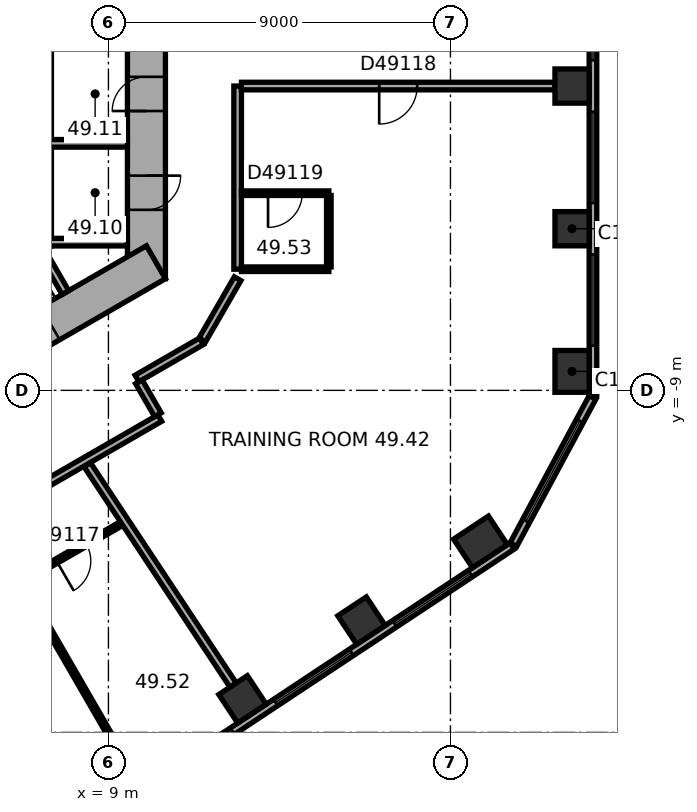
"""IFC4 building model, lengths in metres.
Left out: names, types, materials, properties, quantities, classifications, styles, units other than length and angle.
Written with IfcOpenShell. Run it as: python <this file> out.ifc"""

import sys

from ifc_helpers import new_model, si_unit, direction, frame, frame_2d, origin, origin_2d, place, context, subcontext, project, spatial, rectangle, extrude, element, fill, save


model = new_model("IFC4")
c1 = context("Model", 3, precision=1e-05, world=origin(), true_north=direction((0.0, 1.0)))
c2 = subcontext(c1, "Body", "Model", "MODEL_VIEW")
j1 = project(units=[si_unit("LENGTHUNIT", "METRE"), si_unit("PLANEANGLEUNIT", "RADIAN")], contexts=[c1])
p1 = place(None, origin())
s1 = spatial("IfcSite", under=j1, at=p1, CompositionType="ELEMENT")
p2 = place(p1, origin())
s2 = spatial("IfcBuilding", under=s1, at=p2, CompositionType="ELEMENT")
p3 = place(p2, frame((0.0, 0.0, 198.4)))
s3 = spatial("IfcBuildingStorey", under=s2, at=p3, CompositionType="ELEMENT", Elevation=198.4)
p4 = place(p3, frame((21.2, -8.501, 0.0), z_axis=(0.0, 0.0, 1.0), x_axis=(0.0, 1.0, 0.0)))
e1 = element("IfcColumn", 1, at=p4, inside=s3, PredefinedType="COLUMN", context=c2, shape_type="SweptSolid", body=[
    extrude(rectangle(XDim=1.1, YDim=0.9, at=origin_2d()), origin(), (0.0, 0.0, 1.0), 3.7),
])
for number, where, z_axis, x_axis in (
    (2, (21.2, -4.747, 0.0), (0.0, 0.0, 1.0), (0.0, 1.0, 0.0)),
    (3, (21.2, -0.993, 0.0), (0.0, 0.0, 1.0), (0.0, 1.0, 0.0)),
    (4, (12.529, -17.13, 0.0), (0.0, 0.0, 1.0), (0.834, 0.552, 0.0)),
    (5, (15.659, -15.058, 0.0), (0.0, 0.0, 1.0), (0.834, 0.552, 0.0)),
):
    element("IfcColumn", number, at=place(p3, frame(where, z_axis=z_axis, x_axis=x_axis)), inside=s3, PredefinedType="COLUMN", context=c2, shape_type="SweptSolid", body=[
        extrude(rectangle(XDim=0.9, YDim=0.9, at=origin_2d()), origin(), (0.0, 0.0, 1.0), 3.7),
    ])
p5 = place(p3, frame((18.79, -12.986, 0.0), z_axis=(0.0, 0.0, 1.0), x_axis=(0.833885822067, 0.551936985312, 0.0)))
e6 = element("IfcColumn", 6, at=p5, inside=s3, PredefinedType="COLUMN", context=c2, shape_type="SweptSolid", body=[
    extrude(rectangle(XDim=1.1, YDim=0.9, at=origin_2d()), origin(), (0.0, 0.0, 1.0), 3.7),
])
p6 = place(p3, frame((10.0, -6.062, 0.0), z_axis=(0.0, 0.0, 1.0), x_axis=(0.0, 1.0, 0.0)))
e7 = element("IfcWall", 7, at=p6, inside=s3, PredefinedType="SHEAR", context=c2, shape_type="SweptSolid", body=[
    extrude(rectangle(XDim=12.125, YDim=1.0, at=frame_2d((6.062, 0.0))), origin(), (0.0, 0.0, 1.0), 3.7),
])
p7 = place(p6, frame((6.262, 0.0, 0.0)))
e8 = element("IfcOpeningElement", 8, at=p7, cuts=e7, PredefinedType="OPENING", context=c2, shape_type="SweptSolid", body=[
    extrude(rectangle(XDim=1.5, YDim=2.1, at=frame_2d((0.75, 1.05))), frame((0.0, 0.51, 0.0), z_axis=(0.0, -1.0, 0.0), x_axis=(1.0, 0.0, 0.0)), (0.0, 0.0, 1.0), 1.02),
])
p8 = place(p6, frame((1.812, 0.0, 0.0)))
e9 = element("IfcOpeningElement", 9, at=p8, cuts=e7, PredefinedType="OPENING", context=c2, shape_type="SweptSolid", body=[
    extrude(rectangle(XDim=0.9, YDim=2.1, at=frame_2d((0.45, 1.05))), frame((0.0, 0.51, 0.0), z_axis=(0.0, -1.0, 0.0), x_axis=(1.0, 0.0, 0.0)), (0.0, 0.0, 1.0), 1.02),
])
p9 = place(p6, frame((4.412, 0.0, 0.0)))
e10 = element("IfcOpeningElement", 10, at=p9, cuts=e7, PredefinedType="OPENING", context=c2, shape_type="SweptSolid", body=[
    extrude(rectangle(XDim=0.9, YDim=2.1, at=frame_2d((0.45, 1.05))), frame((0.0, 0.51, 0.0), z_axis=(0.0, -1.0, 0.0), x_axis=(1.0, 0.0, 0.0)), (0.0, 0.0, 1.0), 1.02),
])
p10 = place(p3, frame((-0.25, -11.691, 0.0), z_axis=(0.0, 0.0, 1.0), x_axis=(0.866022616891, 0.50000482701, 0.0)))
e11 = element("IfcWall", 11, at=p10, inside=s3, PredefinedType="SHEAR", context=c2, shape_type="SweptSolid", body=[
    extrude(rectangle(XDim=12.125, YDim=1.0, at=frame_2d((6.062, 0.0))), origin(), (0.0, 0.0, 1.0), 3.7),
])
p11 = place(p10, frame((2.612, 0.0, 0.0)))
e12 = element("IfcOpeningElement", 12, at=p11, cuts=e11, PredefinedType="OPENING", context=c2, shape_type="SweptSolid", body=[
    extrude(rectangle(XDim=1.1, YDim=2.1, at=frame_2d((0.55, 1.05))), frame((0.0, 0.51, 0.0), z_axis=(0.0, -1.0, 0.0), x_axis=(1.0, 0.0, 0.0)), (0.0, 0.0, 1.0), 1.02),
])
p12 = place(p10, frame((5.212, 0.0, 0.0)))
e13 = element("IfcOpeningElement", 13, at=p12, cuts=e11, PredefinedType="OPENING", context=c2, shape_type="SweptSolid", body=[
    extrude(rectangle(XDim=1.1, YDim=2.1, at=frame_2d((0.55, 1.05))), frame((0.0, 0.51, 0.0), z_axis=(0.0, -1.0, 0.0), x_axis=(1.0, 0.0, 0.0)), (0.0, 0.0, 1.0), 1.02),
])
p13 = place(p10, frame((7.812, 0.0, 0.0)))
e14 = element("IfcOpeningElement", 14, at=p13, cuts=e11, PredefinedType="OPENING", context=c2, shape_type="SweptSolid", body=[
    extrude(rectangle(XDim=1.1, YDim=2.1, at=frame_2d((0.55, 1.05))), frame((0.0, 0.51, 0.0), z_axis=(0.0, -1.0, 0.0), x_axis=(1.0, 0.0, 0.0)), (0.0, 0.0, 1.0), 1.02),
])
p14 = place(p3, frame((21.75, -9.138, 0.0), z_axis=(0.0, 0.0, 1.0), x_axis=(0.0, 1.0, 0.0)))
e15 = element("IfcWall", 15, at=p14, inside=s3, PredefinedType="STANDARD", context=c2, shape_type="SweptSolid", body=[
    extrude(rectangle(XDim=20.044, YDim=0.2, at=frame_2d((10.022, 0.0))), origin(), (0.0, 0.0, 1.0), 3.7),
])
p15 = place(p14, frame((1.314, 0.0, 0.9)))
e16 = element("IfcOpeningElement", 16, at=p15, cuts=e15, PredefinedType="OPENING", context=c2, shape_type="SweptSolid", body=[
    extrude(rectangle(XDim=2.4, YDim=2.0, at=frame_2d((1.2, 1.0))), frame((0.0, 0.11, 0.0), z_axis=(0.0, -1.0, 0.0), x_axis=(1.0, 0.0, 0.0)), (0.0, 0.0, 1.0), 0.22),
])
p16 = place(p14, frame((5.069, 0.0, 0.9)))
e17 = element("IfcOpeningElement", 17, at=p16, cuts=e15, PredefinedType="OPENING", context=c2, shape_type="SweptSolid", body=[
    extrude(rectangle(XDim=2.4, YDim=2.0, at=frame_2d((1.2, 1.0))), frame((0.0, 0.11, 0.0), z_axis=(0.0, -1.0, 0.0), x_axis=(1.0, 0.0, 0.0)), (0.0, 0.0, 1.0), 0.22),
])
p17 = place(p14, frame((8.823, 0.0, 0.9)))
e18 = element("IfcOpeningElement", 18, at=p17, cuts=e15, PredefinedType="OPENING", context=c2, shape_type="SweptSolid", body=[
    extrude(rectangle(XDim=2.4, YDim=2.0, at=frame_2d((1.2, 1.0))), frame((0.0, 0.11, 0.0), z_axis=(0.0, -1.0, 0.0), x_axis=(1.0, 0.0, 0.0)), (0.0, 0.0, 1.0), 0.22),
])
p18 = place(p14, frame((12.577, 0.0, 0.9)))
e19 = element("IfcOpeningElement", 19, at=p18, cuts=e15, PredefinedType="OPENING", context=c2, shape_type="SweptSolid", body=[
    extrude(rectangle(XDim=2.4, YDim=2.0, at=frame_2d((1.2, 1.0))), frame((0.0, 0.11, 0.0), z_axis=(0.0, -1.0, 0.0), x_axis=(1.0, 0.0, 0.0)), (0.0, 0.0, 1.0), 0.22),
])
p19 = place(p14, frame((16.331, 0.0, 0.9)))
e20 = element("IfcOpeningElement", 20, at=p19, cuts=e15, PredefinedType="OPENING", context=c2, shape_type="SweptSolid", body=[
    extrude(rectangle(XDim=2.4, YDim=2.0, at=frame_2d((1.2, 1.0))), frame((0.0, 0.11, 0.0), z_axis=(0.0, -1.0, 0.0), x_axis=(1.0, 0.0, 0.0)), (0.0, 0.0, 1.0), 0.22),
])
p20 = place(p3, frame((2.911, -24.156, 0.0), z_axis=(0.0, 0.0, 1.0), x_axis=(0.833882163564, 0.551942512668, 0.0)))
e21 = element("IfcWall", 21, at=p20, inside=s3, PredefinedType="STANDARD", context=c2, shape_type="SweptSolid", body=[
    extrude(rectangle(XDim=20.044, YDim=0.2, at=frame_2d((10.022, 0.0))), origin(), (0.0, 0.0, 1.0), 3.7),
])
p21 = place(p20, frame((1.313, 0.0, 0.9)))
e22 = element("IfcOpeningElement", 22, at=p21, cuts=e21, PredefinedType="OPENING", context=c2, shape_type="SweptSolid", body=[
    extrude(rectangle(XDim=2.4, YDim=2.0, at=frame_2d((1.2, 1.0))), frame((0.0, 0.11, 0.0), z_axis=(0.0, -1.0, 0.0), x_axis=(1.0, 0.0, 0.0)), (0.0, 0.0, 1.0), 0.22),
])
p22 = place(p20, frame((5.067, 0.0, 0.9)))
e23 = element("IfcOpeningElement", 23, at=p22, cuts=e21, PredefinedType="OPENING", context=c2, shape_type="SweptSolid", body=[
    extrude(rectangle(XDim=2.4, YDim=2.0, at=frame_2d((1.2, 1.0))), frame((0.0, 0.11, 0.0), z_axis=(0.0, -1.0, 0.0), x_axis=(1.0, 0.0, 0.0)), (0.0, 0.0, 1.0), 0.22),
])
p23 = place(p20, frame((8.821, 0.0, 0.9)))
e24 = element("IfcOpeningElement", 24, at=p23, cuts=e21, PredefinedType="OPENING", context=c2, shape_type="SweptSolid", body=[
    extrude(rectangle(XDim=2.4, YDim=2.0, at=frame_2d((1.2, 1.0))), frame((0.0, 0.11, 0.0), z_axis=(0.0, -1.0, 0.0), x_axis=(1.0, 0.0, 0.0)), (0.0, 0.0, 1.0), 0.22),
])
p24 = place(p20, frame((12.575, 0.0, 0.9)))
e25 = element("IfcOpeningElement", 25, at=p24, cuts=e21, PredefinedType="OPENING", context=c2, shape_type="SweptSolid", body=[
    extrude(rectangle(XDim=2.4, YDim=2.0, at=frame_2d((1.2, 1.0))), frame((0.0, 0.11, 0.0), z_axis=(0.0, -1.0, 0.0), x_axis=(1.0, 0.0, 0.0)), (0.0, 0.0, 1.0), 0.22),
])
p25 = place(p20, frame((16.329, 0.0, 0.9)))
e26 = element("IfcOpeningElement", 26, at=p25, cuts=e21, PredefinedType="OPENING", context=c2, shape_type="SweptSolid", body=[
    extrude(rectangle(XDim=2.4, YDim=2.0, at=frame_2d((1.2, 1.0))), frame((0.0, 0.11, 0.0), z_axis=(0.0, -1.0, 0.0), x_axis=(1.0, 0.0, 0.0)), (0.0, 0.0, 1.0), 0.22),
])
p26 = place(p3, frame((19.658, -13.057, 0.0), z_axis=(0.0, 0.0, 1.0), x_axis=(0.473307879841, 0.880897071672, 0.0)))
e27 = element("IfcWall", 27, at=p26, inside=s3, PredefinedType="STANDARD", context=c2, shape_type="SweptSolid", body=[
    extrude(rectangle(XDim=4.395, YDim=0.2, at=frame_2d((2.197, 0.0))), origin(), (0.0, 0.0, 1.0), 3.7),
])
p27 = place(p26, frame((0.698, 0.0, 0.9)))
e28 = element("IfcOpeningElement", 28, at=p27, cuts=e27, PredefinedType="OPENING", context=c2, shape_type="SweptSolid", body=[
    extrude(rectangle(XDim=3.0, YDim=2.0, at=frame_2d((1.5, 1.0))), frame((0.0, 0.11, 0.0), z_axis=(0.0, -1.0, 0.0), x_axis=(1.0, 0.0, 0.0)), (0.0, 0.0, 1.0), 0.22),
])
for number, where, z_axis, x_axis in (
    (29, (7.3, -5.1, 0.0), (0.0, 0.0, 1.0), (1.0, 0.0, 0.0)),
    (30, (7.3, -2.5, 0.0), (0.0, 0.0, 1.0), (1.0, 0.0, 0.0)),
    (31, (6.768, -4.522, 0.0), (0.0, 0.0, 1.0), (0.5, -0.866, 0.0)),
):
    element("IfcWall", number, at=place(p3, frame(where, z_axis=z_axis, x_axis=x_axis)), inside=s3, PredefinedType="PARTITIONING", context=c2, shape_type="SweptSolid", body=[
        extrude(rectangle(XDim=2.2, YDim=0.2, at=frame_2d((1.1, 0.0))), origin(), (0.0, 0.0, 1.0), 3.42),
    ])
p28 = place(p3, frame((2.816, -14.079, 0.0), z_axis=(0.0, 0.0, 1.0), x_axis=(0.866021128829, 0.500007404367, 0.0)))
e32 = element("IfcWall", 32, at=p28, inside=s3, PredefinedType="PARTITIONING", context=c2, shape_type="SweptSolid", body=[
    extrude(rectangle(XDim=8.702, YDim=0.2, at=frame_2d((4.351, 0.0))), origin(), (0.0, 0.0, 1.0), 3.42),
])
p29 = place(p28, frame((2.714, 0.0, 0.0)))
e33 = element("IfcOpeningElement", 33, at=p29, cuts=e32, PredefinedType="OPENING", context=c2, shape_type="SweptSolid", body=[
    extrude(rectangle(XDim=1.0, YDim=2.1, at=frame_2d((0.5, 1.05))), frame((0.0, 0.11, 0.0), z_axis=(0.0, -1.0, 0.0), x_axis=(1.0, 0.0, 0.0)), (0.0, 0.0, 1.0), 0.22),
])
p30 = place(p3, frame((3.005, -16.164, 0.0), z_axis=(0.0, 0.0, 1.0), x_axis=(0.866018452427, 0.500012039911, 0.0)))
e34 = element("IfcWall", 34, at=p30, inside=s3, PredefinedType="PARTITIONING", context=c2, shape_type="SweptSolid", body=[
    extrude(rectangle(XDim=7.322, YDim=0.12, at=frame_2d((3.661, 0.0))), origin(), (0.0, 0.0, 1.0), 3.42),
])
p31 = place(p30, frame((0.55, 0.0, 0.0)))
e35 = element("IfcOpeningElement", 35, at=p31, cuts=e34, PredefinedType="OPENING", context=c2, shape_type="SweptSolid", body=[
    extrude(rectangle(XDim=1.0, YDim=2.1, at=frame_2d((0.5, 1.05))), frame((0.0, 0.07, 0.0), z_axis=(0.0, -1.0, 0.0), x_axis=(1.0, 0.0, 0.0)), (0.0, 0.0, 1.0), 0.14),
])
p32 = place(p30, frame((2.736, 0.0, 0.0)))
e36 = element("IfcOpeningElement", 36, at=p32, cuts=e34, PredefinedType="OPENING", context=c2, shape_type="SweptSolid", body=[
    extrude(rectangle(XDim=0.9, YDim=2.1, at=frame_2d((0.45, 1.05))), frame((0.0, 0.07, 0.0), z_axis=(0.0, -1.0, 0.0), x_axis=(1.0, 0.0, 0.0)), (0.0, 0.0, 1.0), 0.14),
])
p33 = place(p30, frame((5.347, 0.0, 0.0)))
e37 = element("IfcOpeningElement", 37, at=p33, cuts=e34, PredefinedType="OPENING", context=c2, shape_type="SweptSolid", body=[
    extrude(rectangle(XDim=0.9, YDim=2.1, at=frame_2d((0.45, 1.05))), frame((0.0, 0.07, 0.0), z_axis=(0.0, -1.0, 0.0), x_axis=(1.0, 0.0, 0.0)), (0.0, 0.0, 1.0), 0.14),
])
p34 = place(p3, frame((9.385, -18.672, 0.0), z_axis=(0.0, 0.0, 1.0), x_axis=(-0.500012117035, 0.866018407898, 0.0)))
e38 = element("IfcWall", 38, at=p34, inside=s3, PredefinedType="PARTITIONING", context=c2, shape_type="SweptSolid", body=[
    extrude(rectangle(XDim=5.302, YDim=0.12, at=frame_2d((2.651, 0.0))), origin(), (0.0, 0.0, 1.0), 2.87),
])
p35 = place(p3, frame((9.752, -8.688, 0.0), z_axis=(0.0, 0.0, 1.0), x_axis=(0.865974105138, 0.500088841337, 0.0)))
e39 = element("IfcWall", 39, at=p35, inside=s3, PredefinedType="PARTITIONING", context=c2, shape_type="SweptSolid", body=[
    extrude(rectangle(XDim=1.961, YDim=0.2, at=frame_2d((0.98, 0.0))), origin(), (0.0, 0.0, 1.0), 3.42),
])
p36 = place(p3, frame((10.302, -9.642, 0.0), z_axis=(0.0, 0.0, 1.0), x_axis=(-0.500074377092, 0.865982457891, 0.0)))
e40 = element("IfcWall", 40, at=p36, inside=s3, PredefinedType="PARTITIONING", context=c2, shape_type="SweptSolid", body=[
    extrude(rectangle(XDim=1.001, YDim=0.2, at=frame_2d((0.5, 0.0))), origin(), (0.0, 0.0, 1.0), 3.42),
])
p37 = place(p3, frame((11.47, -7.673, 0.0), z_axis=(0.0, 0.0, 1.0), x_axis=(0.499964847546, 0.866045698112, 0.0)))
e41 = element("IfcWall", 41, at=p37, inside=s3, PredefinedType="PARTITIONING", context=c2, shape_type="SweptSolid", body=[
    extrude(rectangle(XDim=1.86, YDim=0.2, at=frame_2d((0.93, 0.0))), origin(), (0.0, 0.0, 1.0), 3.42),
])
p38 = place(p3, frame((12.281, -16.755, 0.0), z_axis=(0.0, 0.0, 1.0), x_axis=(-0.551925794663, 0.833893228888, 0.0)))
e42 = element("IfcWall", 42, at=p38, inside=s3, PredefinedType="PARTITIONING", context=c2, shape_type="SweptSolid", body=[
    extrude(rectangle(XDim=6.953, YDim=0.2, at=frame_2d((3.476, 0.0))), origin(), (0.0, 0.0, 1.0), 3.42),
])
p39 = place(p3, frame((12.4, -5.812, 0.0), z_axis=(0.0, 0.0, 1.0), x_axis=(0.0, 1.0, 0.0)))
e43 = element("IfcWall", 43, at=p39, inside=s3, PredefinedType="PARTITIONING", context=c2, shape_type="SweptSolid", body=[
    extrude(rectangle(XDim=4.819, YDim=0.2, at=frame_2d((2.41, 0.0))), origin(), (0.0, 0.0, 1.0), 3.42),
])
p40 = place(p3, frame((12.5, -3.812, 0.0), z_axis=(0.0, 0.0, 1.0), x_axis=(1.0, 0.0, 0.0)))
e44 = element("IfcWall", 44, at=p40, inside=s3, PredefinedType="PARTITIONING", context=c2, shape_type="SweptSolid", body=[
    extrude(rectangle(XDim=2.3, YDim=0.12, at=frame_2d((1.15, 0.0))), origin(), (0.0, 0.0, 1.0), 3.42),
])
p41 = place(p40, frame((0.7, 0.0, 0.0)))
e45 = element("IfcOpeningElement", 45, at=p41, cuts=e44, PredefinedType="OPENING", context=c2, shape_type="SweptSolid", body=[
    extrude(rectangle(XDim=0.9, YDim=2.1, at=frame_2d((0.45, 1.05))), frame((0.0, 0.07, 0.0), z_axis=(0.0, -1.0, 0.0), x_axis=(1.0, 0.0, 0.0)), (0.0, 0.0, 1.0), 0.14),
])
p42 = place(p3, frame((12.5, -0.993, 0.0), z_axis=(0.0, 0.0, 1.0), x_axis=(1.0, 0.0, 0.0)))
e46 = element("IfcWall", 46, at=p42, inside=s3, PredefinedType="PARTITIONING", context=c2, shape_type="SweptSolid", body=[
    extrude(rectangle(XDim=8.25, YDim=0.2, at=frame_2d((4.125, 0.0))), origin(), (0.0, 0.0, 1.0), 2.87),
])
p43 = place(p42, frame((3.625, 0.0, 0.0)))
e47 = element("IfcOpeningElement", 47, at=p43, cuts=e46, PredefinedType="OPENING", context=c2, shape_type="SweptSolid", body=[
    extrude(rectangle(XDim=1.0, YDim=2.1, at=frame_2d((0.5, 1.05))), frame((0.0, 0.11, 0.0), z_axis=(0.0, -1.0, 0.0), x_axis=(1.0, 0.0, 0.0)), (0.0, 0.0, 1.0), 0.22),
])
p44 = place(p3, frame((14.8, -5.812, 0.0), z_axis=(0.0, 0.0, 1.0), x_axis=(-1.0, 0.0, 0.0)))
e48 = element("IfcWall", 48, at=p44, inside=s3, PredefinedType="PARTITIONING", context=c2, shape_type="SweptSolid", body=[
    extrude(rectangle(XDim=2.3, YDim=0.12, at=frame_2d((1.15, 0.0))), origin(), (0.0, 0.0, 1.0), 3.42),
])
p45 = place(p3, frame((14.8, -3.872, 0.0), z_axis=(0.0, 0.0, 1.0), x_axis=(0.0, -1.0, 0.0)))
e49 = element("IfcWall", 49, at=p45, inside=s3, PredefinedType="PARTITIONING", context=c2, shape_type="SweptSolid", body=[
    extrude(rectangle(XDim=1.88, YDim=0.12, at=frame_2d((0.94, 0.0))), origin(), (0.0, 0.0, 1.0), 3.42),
])
p46 = place(p15, origin())
e50 = element("IfcWindow", 50, at=p46, inside=s3, PartitioningType="SINGLE_PANEL", PredefinedType="WINDOW", context=c2, shape_type="SweptSolid", body=[
    extrude(rectangle(XDim=2.4, YDim=2.0, at=frame_2d((1.2, 1.0))), frame((0.0, 0.03, 0.0), z_axis=(0.0, -1.0, 0.0), x_axis=(1.0, 0.0, 0.0)), (0.0, 0.0, 1.0), 0.06),
])
fill(e16, e50)
p47 = place(p16, origin())
e51 = element("IfcWindow", 51, at=p47, inside=s3, PartitioningType="SINGLE_PANEL", PredefinedType="WINDOW", context=c2, shape_type="SweptSolid", body=[
    extrude(rectangle(XDim=2.4, YDim=2.0, at=frame_2d((1.2, 1.0))), frame((0.0, 0.03, 0.0), z_axis=(0.0, -1.0, 0.0), x_axis=(1.0, 0.0, 0.0)), (0.0, 0.0, 1.0), 0.06),
])
fill(e17, e51)
p48 = place(p17, origin())
e52 = element("IfcWindow", 52, at=p48, inside=s3, PartitioningType="SINGLE_PANEL", PredefinedType="WINDOW", context=c2, shape_type="SweptSolid", body=[
    extrude(rectangle(XDim=2.4, YDim=2.0, at=frame_2d((1.2, 1.0))), frame((0.0, 0.03, 0.0), z_axis=(0.0, -1.0, 0.0), x_axis=(1.0, 0.0, 0.0)), (0.0, 0.0, 1.0), 0.06),
])
fill(e18, e52)
p49 = place(p23, origin())
e53 = element("IfcWindow", 53, at=p49, inside=s3, PartitioningType="SINGLE_PANEL", PredefinedType="WINDOW", context=c2, shape_type="SweptSolid", body=[
    extrude(rectangle(XDim=2.4, YDim=2.0, at=frame_2d((1.2, 1.0))), frame((0.0, 0.03, 0.0), z_axis=(0.0, -1.0, 0.0), x_axis=(1.0, 0.0, 0.0)), (0.0, 0.0, 1.0), 0.06),
])
fill(e24, e53)
p50 = place(p24, origin())
e54 = element("IfcWindow", 54, at=p50, inside=s3, PartitioningType="SINGLE_PANEL", PredefinedType="WINDOW", context=c2, shape_type="SweptSolid", body=[
    extrude(rectangle(XDim=2.4, YDim=2.0, at=frame_2d((1.2, 1.0))), frame((0.0, 0.03, 0.0), z_axis=(0.0, -1.0, 0.0), x_axis=(1.0, 0.0, 0.0)), (0.0, 0.0, 1.0), 0.06),
])
fill(e25, e54)
p51 = place(p25, origin())
e55 = element("IfcWindow", 55, at=p51, inside=s3, PartitioningType="SINGLE_PANEL", PredefinedType="WINDOW", context=c2, shape_type="SweptSolid", body=[
    extrude(rectangle(XDim=2.4, YDim=2.0, at=frame_2d((1.2, 1.0))), frame((0.0, 0.03, 0.0), z_axis=(0.0, -1.0, 0.0), x_axis=(1.0, 0.0, 0.0)), (0.0, 0.0, 1.0), 0.06),
])
fill(e26, e55)
p52 = place(p27, origin())
e56 = element("IfcWindow", 56, at=p52, inside=s3, PartitioningType="SINGLE_PANEL", PredefinedType="WINDOW", context=c2, shape_type="SweptSolid", body=[
    extrude(rectangle(XDim=3.0, YDim=2.0, at=frame_2d((1.5, 1.0))), frame((0.0, 0.03, 0.0), z_axis=(0.0, -1.0, 0.0), x_axis=(1.0, 0.0, 0.0)), (0.0, 0.0, 1.0), 0.06),
])
fill(e28, e56)
p53 = place(p8, origin())
e57 = element("IfcDoor", 57, at=p53, inside=s3, OperationType="SINGLE_SWING_LEFT", PredefinedType="DOOR", context=c2, shape_type="SweptSolid", body=[
    extrude(rectangle(XDim=0.9, YDim=2.1, at=frame_2d((0.45, 1.05))), frame((0.0, 0.025, 0.0), z_axis=(0.0, -1.0, 0.0), x_axis=(1.0, 0.0, 0.0)), (0.0, 0.0, 1.0), 0.05),
])
fill(e9, e57)
p54 = place(p9, origin())
e58 = element("IfcDoor", 58, at=p54, inside=s3, OperationType="SINGLE_SWING_LEFT", PredefinedType="DOOR", context=c2, shape_type="SweptSolid", body=[
    extrude(rectangle(XDim=0.9, YDim=2.1, at=frame_2d((0.45, 1.05))), frame((0.0, 0.025, 0.0), z_axis=(0.0, -1.0, 0.0), x_axis=(1.0, 0.0, 0.0)), (0.0, 0.0, 1.0), 0.05),
])
fill(e10, e58)
p55 = place(p33, origin())
e59 = element("IfcDoor", 59, at=p55, inside=s3, OperationType="SINGLE_SWING_LEFT", PredefinedType="DOOR", context=c2, shape_type="SweptSolid", body=[
    extrude(rectangle(XDim=0.9, YDim=2.1, at=frame_2d((0.45, 1.05))), frame((0.0, 0.025, 0.0), z_axis=(0.0, -1.0, 0.0), x_axis=(1.0, 0.0, 0.0)), (0.0, 0.0, 1.0), 0.05),
])
fill(e37, e59)
p56 = place(p43, origin())
e60 = element("IfcDoor", 60, at=p56, inside=s3, OperationType="SINGLE_SWING_LEFT", PredefinedType="DOOR", context=c2, shape_type="SweptSolid", body=[
    extrude(rectangle(XDim=1.0, YDim=2.1, at=frame_2d((0.5, 1.05))), frame((0.0, 0.025, 0.0), z_axis=(0.0, -1.0, 0.0), x_axis=(1.0, 0.0, 0.0)), (0.0, 0.0, 1.0), 0.05),
])
fill(e47, e60)
p57 = place(p41, origin())
e61 = element("IfcDoor", 61, at=p57, inside=s3, OperationType="SINGLE_SWING_LEFT", PredefinedType="DOOR", context=c2, shape_type="SweptSolid", body=[
    extrude(rectangle(XDim=0.9, YDim=2.1, at=frame_2d((0.45, 1.05))), frame((0.0, 0.025, 0.0), z_axis=(0.0, -1.0, 0.0), x_axis=(1.0, 0.0, 0.0)), (0.0, 0.0, 1.0), 0.05),
])
fill(e45, e61)
save(model, sys.argv[1])
